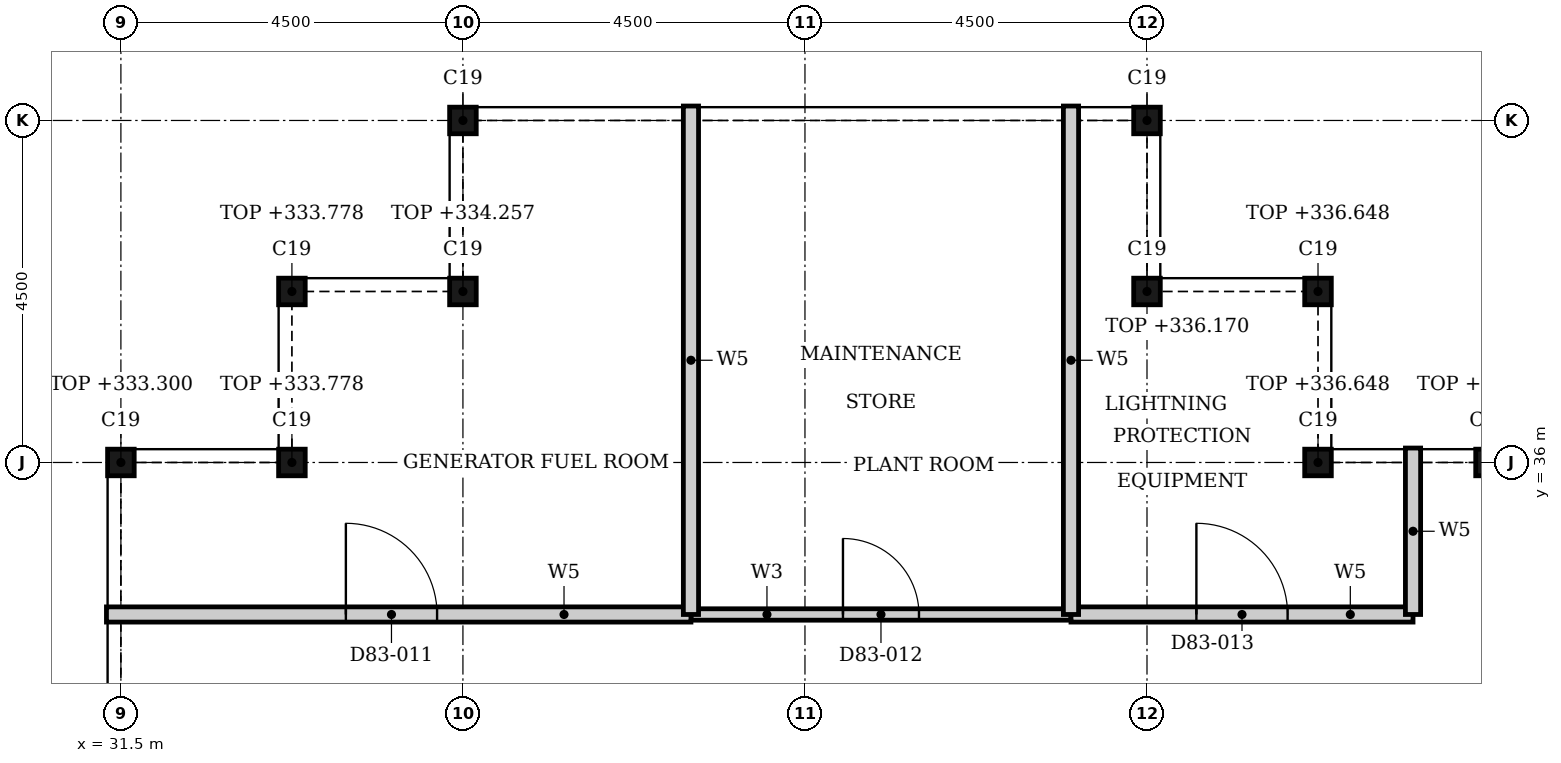
"""IFC4 building model, lengths in metres.
Left out: names, types, materials, properties, quantities, classifications, styles, units other than length and angle.
Written with IfcOpenShell. Run it as: python <this file> out.ifc"""

import sys

from ifc_helpers import new_model, si_unit, direction, frame, frame_2d, origin, origin_2d, place, context, subcontext, project, spatial, rectangle, i_section, extrude, element, fill, save


model = new_model("IFC4")
c1 = context("Model", 3, precision=1e-05, world=origin(), true_north=direction((0.0, 1.0)))
c2 = subcontext(c1, "Body", "Model", "MODEL_VIEW")
j1 = project(units=[si_unit("LENGTHUNIT", "METRE"), si_unit("PLANEANGLEUNIT", "RADIAN")], contexts=[c1])
p1 = place(None, origin())
s1 = spatial("IfcSite", under=j1, at=p1, CompositionType="ELEMENT")
p2 = place(p1, origin())
s2 = spatial("IfcBuilding", under=s1, at=p2, CompositionType="ELEMENT")
p3 = place(p2, frame((0.0, 0.0, 329.6)))
s3 = spatial("IfcBuildingStorey", under=s2, at=p3, CompositionType="ELEMENT", Elevation=329.6)
p4 = place(p3, frame((49.5, 36.0, 0.0), z_axis=(0.0, 0.0, 1.0), x_axis=(1.0, 0.0, 0.0)))
e1 = element("IfcColumn", 1, at=p4, inside=s3, PredefinedType="COLUMN", context=c2, shape_type="SweptSolid", body=[
    extrude(i_section(OverallWidth=0.35, OverallDepth=0.35, WebThickness=0.012, FlangeThickness=0.019, FilletRadius=0.013, at=origin_2d()), origin(), (0.0, 0.0, 1.0), 7.526),
])
for number, where, z_axis, x_axis in (
    (2, (47.25, 36.0, 0.0), (0.0, 0.0, 1.0), (1.0, 0.0, 0.0)),
    (3, (47.25, 38.25, 0.0), (0.0, 0.0, 1.0), (1.0, 0.0, 0.0)),
):
    element("IfcColumn", number, at=place(p3, frame(where, z_axis=z_axis, x_axis=x_axis)), inside=s3, PredefinedType="COLUMN", context=c2, shape_type="SweptSolid", body=[
        extrude(i_section(OverallWidth=0.35, OverallDepth=0.35, WebThickness=0.012, FlangeThickness=0.019, FilletRadius=0.013, at=origin_2d()), origin(), (0.0, 0.0, 1.0), 7.048),
    ])
for number, where, z_axis, x_axis in (
    (4, (45.0, 38.25, 0.0), (0.0, 0.0, 1.0), (1.0, 0.0, 0.0)),
    (5, (45.0, 40.5, 0.0), (0.0, 0.0, 1.0), (1.0, 0.0, 0.0)),
):
    element("IfcColumn", number, at=place(p3, frame(where, z_axis=z_axis, x_axis=x_axis)), inside=s3, PredefinedType="COLUMN", context=c2, shape_type="SweptSolid", body=[
        extrude(i_section(OverallWidth=0.35, OverallDepth=0.35, WebThickness=0.012, FlangeThickness=0.019, FilletRadius=0.013, at=origin_2d()), origin(), (0.0, 0.0, 1.0), 6.569),
    ])
for number, where, z_axis, x_axis in (
    (6, (36.0, 40.5, 0.0), (0.0, 0.0, 1.0), (1.0, 0.0, 0.0)),
    (7, (36.0, 38.25, 0.0), (0.0, 0.0, 1.0), (1.0, 0.0, 0.0)),
):
    element("IfcColumn", number, at=place(p3, frame(where, z_axis=z_axis, x_axis=x_axis)), inside=s3, PredefinedType="COLUMN", context=c2, shape_type="SweptSolid", body=[
        extrude(i_section(OverallWidth=0.35, OverallDepth=0.35, WebThickness=0.012, FlangeThickness=0.019, FilletRadius=0.013, at=origin_2d()), origin(), (0.0, 0.0, 1.0), 4.656),
    ])
for number, where, z_axis, x_axis in (
    (8, (33.75, 38.25, 0.0), (0.0, 0.0, 1.0), (1.0, 0.0, 0.0)),
    (9, (33.75, 36.0, 0.0), (0.0, 0.0, 1.0), (1.0, 0.0, 0.0)),
):
    element("IfcColumn", number, at=place(p3, frame(where, z_axis=z_axis, x_axis=x_axis)), inside=s3, PredefinedType="COLUMN", context=c2, shape_type="SweptSolid", body=[
        extrude(i_section(OverallWidth=0.35, OverallDepth=0.35, WebThickness=0.012, FlangeThickness=0.019, FilletRadius=0.013, at=origin_2d()), origin(), (0.0, 0.0, 1.0), 4.178),
    ])
p5 = place(p3, frame((31.5, 36.0, 0.0), z_axis=(0.0, 0.0, 1.0), x_axis=(1.0, 0.0, 0.0)))
e10 = element("IfcColumn", 10, at=p5, inside=s3, PredefinedType="COLUMN", context=c2, shape_type="SweptSolid", body=[
    extrude(i_section(OverallWidth=0.35, OverallDepth=0.35, WebThickness=0.012, FlangeThickness=0.019, FilletRadius=0.013, at=origin_2d()), origin(), (0.0, 0.0, 1.0), 3.7),
])
p6 = place(p3, frame((39.0, 34.0, 0.0), z_axis=(0.0, 0.0, 1.0), x_axis=(1.0, 0.0, 0.0)))
e11 = element("IfcWall", 11, at=p6, inside=s3, PredefinedType="PARTITIONING", context=c2, shape_type="SweptSolid", body=[
    extrude(rectangle(XDim=5.0, YDim=0.15, at=frame_2d((2.5, 0.0))), origin(), (0.0, 0.0, 1.0), 3.9),
])
p7 = place(p6, frame((2.0, 0.0, 0.0)))
e12 = element("IfcOpeningElement", 12, at=p7, cuts=e11, PredefinedType="OPENING", context=c2, shape_type="SweptSolid", body=[
    extrude(rectangle(XDim=1.0, YDim=2.1, at=frame_2d((0.5, 1.05))), frame((0.0, 0.085, 0.0), z_axis=(0.0, -1.0, 0.0), x_axis=(1.0, 0.0, 0.0)), (0.0, 0.0, 1.0), 0.17),
])
p8 = place(p3, frame((31.31, 34.0, 0.0), z_axis=(0.0, 0.0, 1.0), x_axis=(1.0, 0.0, 0.0)))
e13 = element("IfcWall", 13, at=p8, inside=s3, PredefinedType="PARTITIONING", context=c2, shape_type="SweptSolid", body=[
    extrude(rectangle(XDim=7.69, YDim=0.2, at=frame_2d((3.845, 0.0))), origin(), (0.0, 0.0, 1.0), 3.9),
])
p9 = place(p8, frame((3.15, 0.0, 0.0)))
e14 = element("IfcOpeningElement", 14, at=p9, cuts=e13, PredefinedType="OPENING", context=c2, shape_type="SweptSolid", body=[
    extrude(rectangle(XDim=1.2, YDim=2.1, at=frame_2d((0.6, 1.05))), frame((0.0, 0.11, 0.0), z_axis=(0.0, -1.0, 0.0), x_axis=(1.0, 0.0, 0.0)), (0.0, 0.0, 1.0), 0.22),
])
p10 = place(p3, frame((44.0, 34.0, 0.0), z_axis=(0.0, 0.0, 1.0), x_axis=(1.0, 0.0, 0.0)))
e15 = element("IfcWall", 15, at=p10, inside=s3, PredefinedType="PARTITIONING", context=c2, shape_type="SweptSolid", body=[
    extrude(rectangle(XDim=4.5, YDim=0.2, at=frame_2d((2.25, 0.0))), origin(), (0.0, 0.0, 1.0), 3.9),
])
p11 = place(p10, frame((1.65, 0.0, 0.0)))
e16 = element("IfcOpeningElement", 16, at=p11, cuts=e15, PredefinedType="OPENING", context=c2, shape_type="SweptSolid", body=[
    extrude(rectangle(XDim=1.2, YDim=2.1, at=frame_2d((0.6, 1.05))), frame((0.0, 0.11, 0.0), z_axis=(0.0, -1.0, 0.0), x_axis=(1.0, 0.0, 0.0)), (0.0, 0.0, 1.0), 0.22),
])
for number, where, z_axis, x_axis in (
    (17, (39.0, 34.0, 0.0), (0.0, 0.0, 1.0), (0.0, 1.0, 0.0)),
    (18, (44.0, 34.0, 0.0), (0.0, 0.0, 1.0), (0.0, 1.0, 0.0)),
):
    element("IfcWall", number, at=place(p3, frame(where, z_axis=z_axis, x_axis=x_axis)), inside=s3, PredefinedType="PARTITIONING", context=c2, shape_type="SweptSolid", body=[
        extrude(rectangle(XDim=6.69, YDim=0.2, at=frame_2d((3.345, 0.0))), origin(), (0.0, 0.0, 1.0), 3.9),
    ])
p12 = place(p3, frame((48.5, 34.0, 0.0), z_axis=(0.0, 0.0, 1.0), x_axis=(0.0, 1.0, 0.0)))
e19 = element("IfcWall", 19, at=p12, inside=s3, PredefinedType="PARTITIONING", context=c2, shape_type="SweptSolid", body=[
    extrude(rectangle(XDim=2.19, YDim=0.2, at=frame_2d((1.095, 0.0))), origin(), (0.0, 0.0, 1.0), 3.9),
])
p13 = place(p9, origin())
e20 = element("IfcDoor", 20, at=p13, inside=s3, OperationType="SINGLE_SWING_LEFT", PredefinedType="DOOR", context=c2, shape_type="SweptSolid", body=[
    extrude(rectangle(XDim=1.2, YDim=2.1, at=frame_2d((0.6, 1.05))), frame((0.0, 0.025, 0.0), z_axis=(0.0, -1.0, 0.0), x_axis=(1.0, 0.0, 0.0)), (0.0, 0.0, 1.0), 0.05),
])
fill(e14, e20)
p14 = place(p7, origin())
e21 = element("IfcDoor", 21, at=p14, inside=s3, OperationType="SINGLE_SWING_LEFT", PredefinedType="DOOR", context=c2, shape_type="SweptSolid", body=[
    extrude(rectangle(XDim=1.0, YDim=2.1, at=frame_2d((0.5, 1.05))), frame((0.0, 0.025, 0.0), z_axis=(0.0, -1.0, 0.0), x_axis=(1.0, 0.0, 0.0)), (0.0, 0.0, 1.0), 0.05),
])
fill(e12, e21)
p15 = place(p11, origin())
e22 = element("IfcDoor", 22, at=p15, inside=s3, OperationType="SINGLE_SWING_LEFT", PredefinedType="DOOR", context=c2, shape_type="SweptSolid", body=[
    extrude(rectangle(XDim=1.2, YDim=2.1, at=frame_2d((0.6, 1.05))), frame((0.0, 0.025, 0.0), z_axis=(0.0, -1.0, 0.0), x_axis=(1.0, 0.0, 0.0)), (0.0, 0.0, 1.0), 0.05),
])
fill(e16, e22)
save(model, sys.argv[1])
